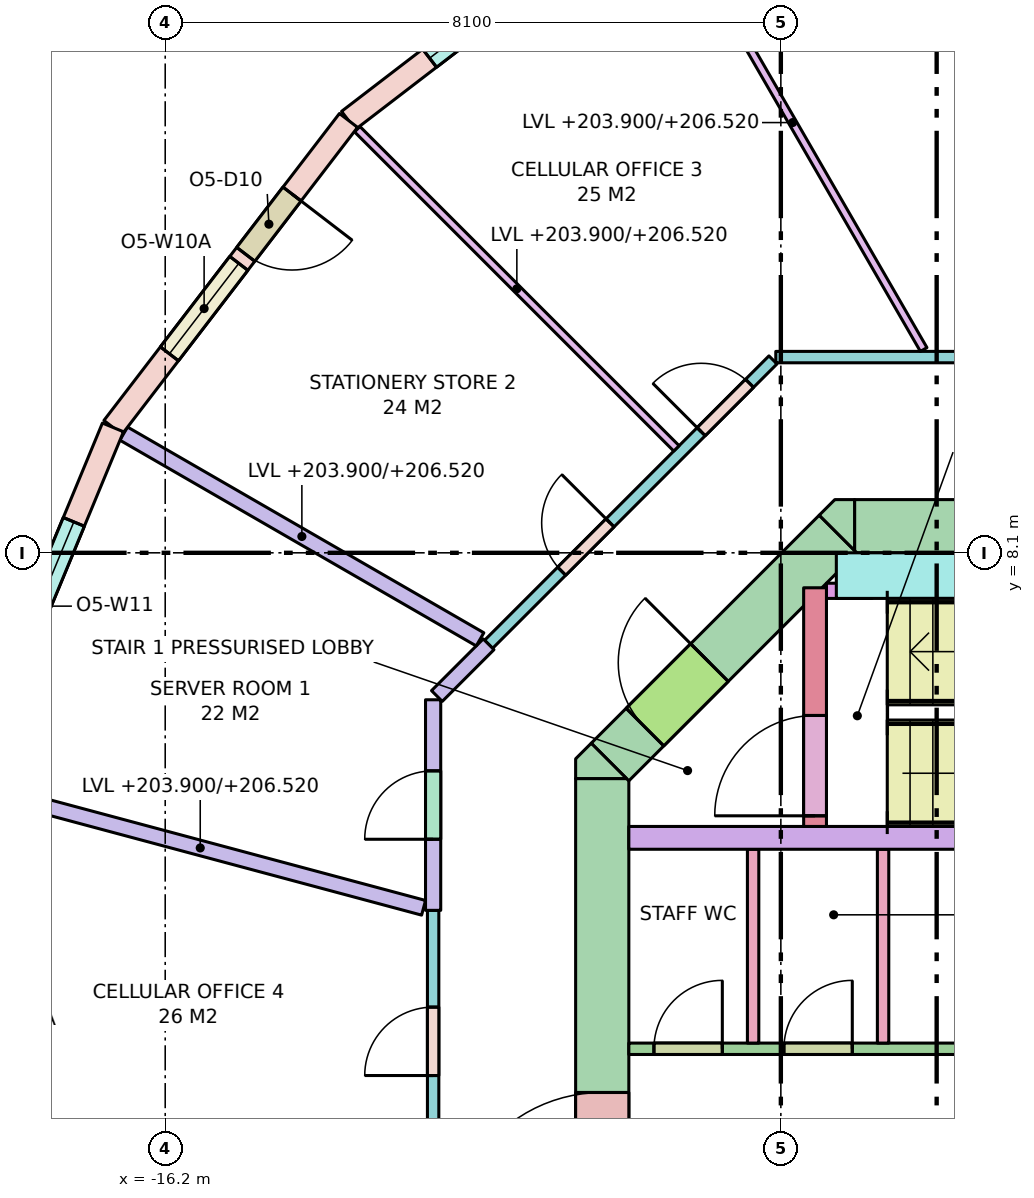
"""IFC4 building model, lengths in metres.
Left out: names, types, materials, properties, quantities, classifications, styles, units other than length and angle.
Written with IfcOpenShell. Run it as: python <this file> out.ifc"""

import sys

from ifc_helpers import new_model, si_unit, direction, frame, frame_2d, origin, place, context, subcontext, project, spatial, polyline, rectangle, outline, extrude, element, fill, save


model = new_model("IFC4")
c1 = context("Model", 3, precision=1e-05, world=origin(), true_north=direction((0.0, 1.0)))
c2 = subcontext(c1, "Body", "Model", "MODEL_VIEW")
j1 = project(units=[si_unit("LENGTHUNIT", "METRE"), si_unit("PLANEANGLEUNIT", "RADIAN")], contexts=[c1])
p1 = place(None, origin())
s1 = spatial("IfcSite", under=j1, at=p1, CompositionType="ELEMENT")
p2 = place(p1, origin())
s2 = spatial("IfcBuilding", under=s1, at=p2, CompositionType="ELEMENT")
p3 = place(p2, frame((0.0, 0.0, 203.9)))
s3 = spatial("IfcBuildingStorey", under=s2, at=p3, CompositionType="ELEMENT", Elevation=203.9)
p4 = place(p3, frame((-7.13, 8.45, -0.28), z_axis=(0.0, 0.0, 1.0), x_axis=(1.0, 0.0, 0.0)))
e1 = element("IfcWall", 1, at=p4, inside=s3, PredefinedType="SHEAR", context=c2, shape_type="SweptSolid", body=[
    extrude(rectangle(XDim=14.26, YDim=0.7, at=frame_2d((7.13, 0.0))), origin(), (0.0, 0.0, 1.0), 3.7),
])
p5 = place(p4, frame((5.48, 0.0, 0.28)))
e2 = element("IfcOpeningElement", 2, at=p5, cuts=e1, PredefinedType="OPENING", context=c2, shape_type="SweptSolid", body=[
    extrude(rectangle(XDim=0.7, YDim=2.1, at=frame_2d((0.35, 1.05))), frame((0.0, 0.36, 0.0), z_axis=(0.0, -1.0, 0.0), x_axis=(1.0, 0.0, 0.0)), (0.0, 0.0, 1.0), 0.72),
])
p6 = place(p4, frame((6.53, 0.0, 0.28)))
e3 = element("IfcOpeningElement", 3, at=p6, cuts=e1, PredefinedType="OPENING", context=c2, shape_type="SweptSolid", body=[
    extrude(rectangle(XDim=0.85, YDim=2.1, at=frame_2d((0.425, 1.05))), frame((0.0, 0.36, 0.0), z_axis=(0.0, -1.0, 0.0), x_axis=(1.0, 0.0, 0.0)), (0.0, 0.0, 1.0), 0.72),
])
p7 = place(p4, frame((7.83, 0.0, 0.28)))
e4 = element("IfcOpeningElement", 4, at=p7, cuts=e1, PredefinedType="OPENING", context=c2, shape_type="SweptSolid", body=[
    extrude(rectangle(XDim=0.85, YDim=2.1, at=frame_2d((0.425, 1.05))), frame((0.0, 0.36, 0.0), z_axis=(0.0, -1.0, 0.0), x_axis=(1.0, 0.0, 0.0)), (0.0, 0.0, 1.0), 0.72),
])
p8 = place(p3, frame((-10.45, -5.13, -0.28), z_axis=(0.0, 0.0, 1.0), x_axis=(0.0, 1.0, 0.0)))
e5 = element("IfcWall", 5, at=p8, inside=s3, PredefinedType="SHEAR", context=c2, shape_type="SweptSolid", body=[
    extrude(rectangle(XDim=10.26, YDim=0.7, at=frame_2d((5.13, 0.0))), origin(), (0.0, 0.0, 1.0), 3.7),
])
p9 = place(p8, frame((4.13, 0.0, 0.28)))
e6 = element("IfcOpeningElement", 6, at=p9, cuts=e5, PredefinedType="OPENING", context=c2, shape_type="SweptSolid", body=[
    extrude(rectangle(XDim=2.0, YDim=2.1, at=frame_2d((1.0, 1.05))), frame((0.0, 0.36, 0.0), z_axis=(0.0, -1.0, 0.0), x_axis=(1.0, 0.0, 0.0)), (0.0, 0.0, 1.0), 0.72),
])
p10 = place(p3, frame((-10.347, 5.347, -0.28), z_axis=(0.0, 0.0, 1.0), x_axis=(0.707106781187, 0.707106781187, 0.0)))
e7 = element("IfcWall", 7, at=p10, inside=s3, PredefinedType="SHEAR", context=c2, shape_type="SweptSolid", body=[
    extrude(rectangle(XDim=4.243, YDim=0.7, at=frame_2d((2.121, 0.0))), origin(), (0.0, 0.0, 1.0), 3.7),
])
p11 = place(p10, frame((0.65, 0.0, 0.28)))
e8 = element("IfcOpeningElement", 8, at=p11, cuts=e7, PredefinedType="OPENING", context=c2, shape_type="SweptSolid", body=[
    extrude(rectangle(XDim=1.2, YDim=2.1, at=frame_2d((0.6, 1.05))), frame((0.0, 0.36, 0.0), z_axis=(0.0, -1.0, 0.0), x_axis=(1.0, 0.0, 0.0)), (0.0, 0.0, 1.0), 0.72),
])
p12 = place(p3, frame((0.0, 0.0, -0.28)))
e9 = element("IfcWall", 9, at=p12, inside=s3, PredefinedType="SHEAR", context=c2, shape_type="SweptSolid", body=[
    extrude(outline(polyline([(-10.595, 5.595), (-10.595, 5.595), (-10.595, 5.595), (-10.13, 5.13), (-10.8, 5.13), (-10.8, 5.13), (-10.8, 5.39), (-10.595, 5.595)])), origin(), (0.0, 0.0, 1.0), 3.7),
])
p13 = place(p3, frame((0.0, 0.0, -0.28)))
e10 = element("IfcWall", 10, at=p13, inside=s3, PredefinedType="SHEAR", context=c2, shape_type="SweptSolid", body=[
    extrude(outline(polyline([(-7.39, 8.8), (-7.13, 8.8), (-7.13, 8.8), (-7.13, 8.13), (-7.595, 8.595), (-7.595, 8.595), (-7.595, 8.595), (-7.39, 8.8)])), origin(), (0.0, 0.0, 1.0), 3.7),
])
p14 = place(p3, frame((-10.1, 4.35, 0.0), z_axis=(0.0, 0.0, 1.0), x_axis=(1.0, 0.0, 0.0)))
e11 = element("IfcWall", 11, at=p14, inside=s3, PredefinedType="SOLIDWALL", context=c2, shape_type="SweptSolid", body=[
    extrude(rectangle(XDim=8.1, YDim=0.3, at=frame_2d((4.05, 0.0))), origin(), (0.0, 0.0, 1.0), 3.42),
])
p15 = place(p3, frame((-7.65, 4.5, 0.0), z_axis=(0.0, 0.0, 1.0), x_axis=(0.0, 1.0, 0.0)))
e12 = element("IfcWall", 12, at=p15, inside=s3, PredefinedType="SHEAR", context=c2, shape_type="SweptSolid", body=[
    extrude(rectangle(XDim=3.14, YDim=0.3, at=frame_2d((1.57, 0.0))), origin(), (0.0, 0.0, 1.0), 3.42),
])
p16 = place(p15, frame((0.14, 0.0, 0.0)))
e13 = element("IfcOpeningElement", 13, at=p16, cuts=e12, PredefinedType="OPENING", context=c2, shape_type="SweptSolid", body=[
    extrude(rectangle(XDim=1.32, YDim=2.1, at=frame_2d((0.66, 1.05))), frame((0.0, 0.16, 0.0), z_axis=(0.0, -1.0, 0.0), x_axis=(1.0, 0.0, 0.0)), (0.0, 0.0, 1.0), 0.32),
])
p17 = place(p3, frame((-7.37, 7.8, 0.0), z_axis=(0.0, 0.0, 1.0), x_axis=(1.0, 0.0, 0.0)))
e14 = element("IfcWall", 14, at=p17, inside=s3, PredefinedType="SHEAR", context=c2, shape_type="SweptSolid", body=[
    extrude(rectangle(XDim=5.37, YDim=0.6, at=frame_2d((2.685, 0.0))), origin(), (0.0, 0.0, 1.0), 3.42),
])
p18 = place(p3, frame((-7.5, 7.6, 0.0), z_axis=(0.0, 0.0, 1.0), x_axis=(1.0, 0.0, 0.0)))
e15 = element("IfcWall", 15, at=p18, inside=s3, PredefinedType="SHEAR", context=c2, shape_type="SweptSolid", body=[
    extrude(rectangle(XDim=0.6, YDim=0.2, at=frame_2d((0.3, 0.0))), origin(), (0.0, 0.0, 1.0), 3.42),
])
p19 = place(p3, frame((-9.75, 16.887, 0.0), z_axis=(0.0, 0.0, 1.0), x_axis=(-0.79335619014, -0.608757714995, 0.0)))
e16 = element("IfcWall", 16, at=p19, inside=s3, PredefinedType="STANDARD", context=c2, shape_type="SweptSolid", body=[
    extrude(rectangle(XDim=5.091, YDim=0.3, at=frame_2d((2.545, 0.0))), origin(), (0.0, 0.0, 1.0), 3.42),
])
p20 = place(p19, frame((1.345, 0.0, 0.8)))
e17 = element("IfcOpeningElement", 17, at=p20, cuts=e16, PredefinedType="OPENING", context=c2, shape_type="SweptSolid", body=[
    extrude(rectangle(XDim=2.4, YDim=2.4, at=frame_2d((1.2, 1.2))), frame((0.0, 0.16, 0.0), z_axis=(0.0, -1.0, 0.0), x_axis=(1.0, 0.0, 0.0)), (0.0, 0.0, 1.0), 0.32),
])
p21 = place(p3, frame((-13.789, 13.789, 0.0), z_axis=(0.0, 0.0, 1.0), x_axis=(-0.608757714995, -0.79335619014, 0.0)))
e18 = element("IfcWall", 18, at=p21, inside=s3, PredefinedType="STANDARD", context=c2, shape_type="SweptSolid", body=[
    extrude(rectangle(XDim=5.091, YDim=0.3, at=frame_2d((2.545, 0.0))), origin(), (0.0, 0.0, 1.0), 3.42),
])
p22 = place(p21, frame((1.22, 0.0, 0.0)))
e19 = element("IfcOpeningElement", 19, at=p22, cuts=e18, PredefinedType="OPENING", context=c2, shape_type="SweptSolid", body=[
    extrude(rectangle(XDim=1.0, YDim=2.4, at=frame_2d((0.5, 1.2))), frame((0.0, 0.16, 0.0), z_axis=(0.0, -1.0, 0.0), x_axis=(1.0, 0.0, 0.0)), (0.0, 0.0, 1.0), 0.32),
])
p23 = place(p21, frame((2.37, 0.0, 0.8)))
e20 = element("IfcOpeningElement", 20, at=p23, cuts=e18, PredefinedType="OPENING", context=c2, shape_type="SweptSolid", body=[
    extrude(rectangle(XDim=1.5, YDim=2.4, at=frame_2d((0.75, 1.2))), frame((0.0, 0.16, 0.0), z_axis=(0.0, -1.0, 0.0), x_axis=(1.0, 0.0, 0.0)), (0.0, 0.0, 1.0), 0.32),
])
p24 = place(p3, frame((-16.887, 9.75, 0.0), z_axis=(0.0, 0.0, 1.0), x_axis=(-0.382724538613, -0.923862504675, 0.0)))
e21 = element("IfcWall", 21, at=p24, inside=s3, PredefinedType="STANDARD", context=c2, shape_type="SweptSolid", body=[
    extrude(rectangle(XDim=5.091, YDim=0.3, at=frame_2d((2.545, 0.0))), origin(), (0.0, 0.0, 1.0), 3.42),
])
p25 = place(p24, frame((1.345, 0.0, 0.8)))
e22 = element("IfcOpeningElement", 22, at=p25, cuts=e21, PredefinedType="OPENING", context=c2, shape_type="SweptSolid", body=[
    extrude(rectangle(XDim=2.4, YDim=2.4, at=frame_2d((1.2, 1.2))), frame((0.0, 0.16, 0.0), z_axis=(0.0, -1.0, 0.0), x_axis=(1.0, 0.0, 0.0)), (0.0, 0.0, 1.0), 0.32),
])
for number, where, z_axis, x_axis in (
    (23, (-8.465, 1.65, 0.0), (0.0, 0.0, 1.0), (0.0, 1.0, 0.0)),
    (24, (-6.755, 1.65, 0.0), (0.0, 0.0, 1.0), (0.0, 1.0, 0.0)),
):
    element("IfcWall", number, at=place(p3, frame(where, z_axis=z_axis, x_axis=x_axis)), inside=s3, PredefinedType="PARTITIONING", context=c2, shape_type="SweptSolid", body=[
        extrude(rectangle(XDim=2.55, YDim=0.15, at=frame_2d((1.275, 0.0))), origin(), (0.0, 0.0, 1.0), 3.42),
    ])
p26 = place(p3, frame((-10.1, 1.575, 0.0), z_axis=(0.0, 0.0, 1.0), x_axis=(1.0, 0.0, 0.0)))
e25 = element("IfcWall", 25, at=p26, inside=s3, PredefinedType="PARTITIONING", context=c2, shape_type="SweptSolid", body=[
    extrude(rectangle(XDim=8.1, YDim=0.15, at=frame_2d((4.05, 0.0))), origin(), (0.0, 0.0, 1.0), 3.42),
])
p27 = place(p26, frame((0.33, 0.0, 0.0)))
e26 = element("IfcOpeningElement", 26, at=p27, cuts=e25, PredefinedType="OPENING", context=c2, shape_type="SweptSolid", body=[
    extrude(rectangle(XDim=0.9, YDim=2.1, at=frame_2d((0.45, 1.05))), frame((0.0, 0.085, 0.0), z_axis=(0.0, -1.0, 0.0), x_axis=(1.0, 0.0, 0.0)), (0.0, 0.0, 1.0), 0.17),
])
p28 = place(p26, frame((2.04, 0.0, 0.0)))
e27 = element("IfcOpeningElement", 27, at=p28, cuts=e25, PredefinedType="OPENING", context=c2, shape_type="SweptSolid", body=[
    extrude(rectangle(XDim=0.9, YDim=2.1, at=frame_2d((0.45, 1.05))), frame((0.0, 0.085, 0.0), z_axis=(0.0, -1.0, 0.0), x_axis=(1.0, 0.0, 0.0)), (0.0, 0.0, 1.0), 0.17),
])
p29 = place(p26, frame((5.31, 0.0, 0.0)))
e28 = element("IfcOpeningElement", 28, at=p29, cuts=e25, PredefinedType="OPENING", context=c2, shape_type="SweptSolid", body=[
    extrude(rectangle(XDim=0.9, YDim=2.1, at=frame_2d((0.45, 1.05))), frame((0.0, 0.085, 0.0), z_axis=(0.0, -1.0, 0.0), x_axis=(1.0, 0.0, 0.0)), (0.0, 0.0, 1.0), 0.17),
])
p30 = place(p3, frame((-12.675, -6.167, 0.0), z_axis=(0.0, 0.0, 1.0), x_axis=(0.0, 1.0, 0.0)))
e29 = element("IfcWall", 29, at=p30, inside=s3, PredefinedType="PARTITIONING", context=c2, shape_type="SweptSolid", body=[
    extrude(rectangle(XDim=9.563, YDim=0.15, at=frame_2d((4.781, 0.0))), origin(), (0.0, 0.0, 1.0), 2.62),
])
p31 = place(p30, frame((7.39, 0.0, 0.0)))
e30 = element("IfcOpeningElement", 30, at=p31, cuts=e29, PredefinedType="OPENING", context=c2, shape_type="SweptSolid", body=[
    extrude(rectangle(XDim=0.9, YDim=2.1, at=frame_2d((0.45, 1.05))), frame((0.0, 0.085, 0.0), z_axis=(0.0, -1.0, 0.0), x_axis=(1.0, 0.0, 0.0)), (0.0, 0.0, 1.0), 0.17),
])
p32 = place(p3, frame((-12.675, 3.396, 0.0), z_axis=(0.0, 0.0, 1.0), x_axis=(0.0, 1.0, 0.0)))
e31 = element("IfcWall", 31, at=p32, inside=s3, PredefinedType="PARTITIONING", context=c2, shape_type="SweptSolid", body=[
    extrude(rectangle(XDim=2.77, YDim=0.2, at=frame_2d((1.385, 0.0))), origin(), (0.0, 0.0, 1.0), 2.62),
])
p33 = place(p32, frame((0.935, 0.0, 0.0)))
e32 = element("IfcOpeningElement", 32, at=p33, cuts=e31, PredefinedType="OPENING", context=c2, shape_type="SweptSolid", body=[
    extrude(rectangle(XDim=0.9, YDim=2.1, at=frame_2d((0.45, 1.05))), frame((0.0, 0.11, 0.0), z_axis=(0.0, -1.0, 0.0), x_axis=(1.0, 0.0, 0.0)), (0.0, 0.0, 1.0), 0.22),
])
p34 = place(p3, frame((-12.625, 6.216, 0.0), z_axis=(0.0, 0.0, 1.0), x_axis=(0.707106781187, 0.707106781187, 0.0)))
e33 = element("IfcWall", 33, at=p34, inside=s3, PredefinedType="PARTITIONING", context=c2, shape_type="SweptSolid", body=[
    extrude(rectangle(XDim=0.962, YDim=0.2, at=frame_2d((0.481, 0.0))), origin(), (0.0, 0.0, 1.0), 2.62),
])
p35 = place(p3, frame((-11.945, 6.896, 0.0), z_axis=(0.0, 0.0, 1.0), x_axis=(0.707106781187, 0.707106781187, 0.0)))
e34 = element("IfcWall", 34, at=p35, inside=s3, PredefinedType="PARTITIONING", context=c2, shape_type="SweptSolid", body=[
    extrude(rectangle(XDim=5.291, YDim=0.15, at=frame_2d((2.646, 0.0))), origin(), (0.0, 0.0, 1.0), 2.62),
])
p36 = place(p35, frame((3.956, 0.0, 0.0)))
e35 = element("IfcOpeningElement", 35, at=p36, cuts=e34, PredefinedType="OPENING", context=c2, shape_type="SweptSolid", body=[
    extrude(rectangle(XDim=0.9, YDim=2.1, at=frame_2d((0.45, 1.05))), frame((0.0, 0.085, 0.0), z_axis=(0.0, -1.0, 0.0), x_axis=(1.0, 0.0, 0.0)), (0.0, 0.0, 1.0), 0.17),
])
p37 = place(p35, frame((1.36, 0.0, 0.0)))
e36 = element("IfcOpeningElement", 36, at=p37, cuts=e34, PredefinedType="OPENING", context=c2, shape_type="SweptSolid", body=[
    extrude(rectangle(XDim=0.9, YDim=2.1, at=frame_2d((0.45, 1.05))), frame((0.0, 0.085, 0.0), z_axis=(0.0, -1.0, 0.0), x_axis=(1.0, 0.0, 0.0)), (0.0, 0.0, 1.0), 0.17),
])
p38 = place(p3, frame((-8.167, 10.675, 0.0), z_axis=(0.0, 0.0, 1.0), x_axis=(1.0, 0.0, 0.0)))
e37 = element("IfcWall", 37, at=p38, inside=s3, PredefinedType="PARTITIONING", context=c2, shape_type="SweptSolid", body=[
    extrude(rectangle(XDim=16.333, YDim=0.15, at=frame_2d((8.167, 0.0))), origin(), (0.0, 0.0, 1.0), 2.62),
])
p39 = place(p38, frame((13.155, 0.0, 0.0)))
e38 = element("IfcOpeningElement", 38, at=p39, cuts=e37, PredefinedType="OPENING", context=c2, shape_type="SweptSolid", body=[
    extrude(rectangle(XDim=1.0, YDim=2.1, at=frame_2d((0.5, 1.05))), frame((0.0, 0.085, 0.0), z_axis=(0.0, -1.0, 0.0), x_axis=(1.0, 0.0, 0.0)), (0.0, 0.0, 1.0), 0.17),
])
p40 = place(p38, frame((9.148, 0.0, 0.0)))
e39 = element("IfcOpeningElement", 39, at=p40, cuts=e37, PredefinedType="OPENING", context=c2, shape_type="SweptSolid", body=[
    extrude(rectangle(XDim=0.9, YDim=2.1, at=frame_2d((0.45, 1.05))), frame((0.0, 0.085, 0.0), z_axis=(0.0, -1.0, 0.0), x_axis=(1.0, 0.0, 0.0)), (0.0, 0.0, 1.0), 0.17),
])
p41 = place(p38, frame((5.835, 0.0, 0.0)))
e40 = element("IfcOpeningElement", 40, at=p41, cuts=e37, PredefinedType="OPENING", context=c2, shape_type="SweptSolid", body=[
    extrude(rectangle(XDim=1.8, YDim=2.1, at=frame_2d((0.9, 1.05))), frame((0.0, 0.085, 0.0), z_axis=(0.0, -1.0, 0.0), x_axis=(1.0, 0.0, 0.0)), (0.0, 0.0, 1.0), 0.17),
])
p42 = place(p38, frame((2.751, 0.0, 0.0)))
e41 = element("IfcOpeningElement", 41, at=p42, cuts=e37, PredefinedType="OPENING", context=c2, shape_type="SweptSolid", body=[
    extrude(rectangle(XDim=1.8, YDim=2.1, at=frame_2d((0.9, 1.05))), frame((0.0, 0.085, 0.0), z_axis=(0.0, -1.0, 0.0), x_axis=(1.0, 0.0, 0.0)), (0.0, 0.0, 1.0), 0.17),
])
p43 = place(p3, frame((-6.221, 10.775, 0.0), z_axis=(0.0, 0.0, 1.0), x_axis=(-0.500015661236, 0.866016361577, 0.0)))
e42 = element("IfcWall", 42, at=p43, inside=s3, PredefinedType="PARTITIONING", context=c2, shape_type="SweptSolid", body=[
    extrude(rectangle(XDim=6.895, YDim=0.1, at=frame_2d((3.448, 0.0))), origin(), (0.0, 0.0, 1.0), 2.62),
])
p44 = place(p3, frame((-9.474, 9.474, 0.0), z_axis=(0.0, 0.0, 1.0), x_axis=(-0.707106781187, 0.707106781187, 0.0)))
e43 = element("IfcWall", 43, at=p44, inside=s3, PredefinedType="PARTITIONING", context=c2, shape_type="SweptSolid", body=[
    extrude(rectangle(XDim=5.938, YDim=0.1, at=frame_2d((2.969, 0.0))), origin(), (0.0, 0.0, 1.0), 2.62),
])
p45 = place(p3, frame((-12.058, 6.961, 0.0), z_axis=(0.0, 0.0, 1.0), x_axis=(-0.86601436245, 0.500019123664, 0.0)))
e44 = element("IfcWall", 44, at=p45, inside=s3, PredefinedType="PARTITIONING", context=c2, shape_type="SweptSolid", body=[
    extrude(rectangle(XDim=5.414, YDim=0.2, at=frame_2d((2.707, 0.0))), origin(), (0.0, 0.0, 1.0), 2.62),
])
p46 = place(p3, frame((-12.801, 3.43, 0.0), z_axis=(0.0, 0.0, 1.0), x_axis=(-0.965929245953, 0.258806282407, 0.0)))
e45 = element("IfcWall", 45, at=p46, inside=s3, PredefinedType="PARTITIONING", context=c2, shape_type="SweptSolid", body=[
    extrude(rectangle(XDim=6.084, YDim=0.2, at=frame_2d((3.042, 0.0))), origin(), (0.0, 0.0, 1.0), 2.62),
])
p47 = place(p20, origin())
e46 = element("IfcWindow", 46, at=p47, inside=s3, PartitioningType="SINGLE_PANEL", PredefinedType="WINDOW", context=c2, shape_type="SweptSolid", body=[
    extrude(rectangle(XDim=2.4, YDim=2.4, at=frame_2d((1.2, 1.2))), frame((0.0, 0.03, 0.0), z_axis=(0.0, -1.0, 0.0), x_axis=(1.0, 0.0, 0.0)), (0.0, 0.0, 1.0), 0.06),
])
fill(e17, e46)
p48 = place(p22, origin())
e47 = element("IfcDoor", 47, at=p48, inside=s3, OperationType="SINGLE_SWING_LEFT", PredefinedType="DOOR", context=c2, shape_type="SweptSolid", body=[
    extrude(rectangle(XDim=1.0, YDim=2.4, at=frame_2d((0.5, 1.2))), frame((0.0, 0.025, 0.0), z_axis=(0.0, -1.0, 0.0), x_axis=(1.0, 0.0, 0.0)), (0.0, 0.0, 1.0), 0.05),
])
fill(e19, e47)
p49 = place(p23, origin())
e48 = element("IfcWindow", 48, at=p49, inside=s3, PartitioningType="SINGLE_PANEL", PredefinedType="WINDOW", context=c2, shape_type="SweptSolid", body=[
    extrude(rectangle(XDim=1.5, YDim=2.4, at=frame_2d((0.75, 1.2))), frame((0.0, 0.03, 0.0), z_axis=(0.0, -1.0, 0.0), x_axis=(1.0, 0.0, 0.0)), (0.0, 0.0, 1.0), 0.06),
])
fill(e20, e48)
p50 = place(p25, origin())
e49 = element("IfcWindow", 49, at=p50, inside=s3, PartitioningType="SINGLE_PANEL", PredefinedType="WINDOW", context=c2, shape_type="SweptSolid", body=[
    extrude(rectangle(XDim=2.4, YDim=2.4, at=frame_2d((1.2, 1.2))), frame((0.0, 0.03, 0.0), z_axis=(0.0, -1.0, 0.0), x_axis=(1.0, 0.0, 0.0)), (0.0, 0.0, 1.0), 0.06),
])
fill(e22, e49)
p51 = place(p16, origin())
e50 = element("IfcDoor", 50, at=p51, inside=s3, OperationType="DOUBLE_DOOR_SINGLE_SWING", PredefinedType="DOOR", context=c2, shape_type="SweptSolid", body=[
    extrude(rectangle(XDim=1.32, YDim=2.1, at=frame_2d((0.66, 1.05))), frame((0.0, 0.025, 0.0), z_axis=(0.0, -1.0, 0.0), x_axis=(1.0, 0.0, 0.0)), (0.0, 0.0, 1.0), 0.05),
])
fill(e13, e50)
p52 = place(p11, origin())
e51 = element("IfcDoor", 51, at=p52, inside=s3, OperationType="SINGLE_SWING_RIGHT", PredefinedType="DOOR", context=c2, shape_type="SweptSolid", body=[
    extrude(rectangle(XDim=1.2, YDim=2.1, at=frame_2d((0.6, 1.05))), frame((0.0, 0.025, 0.0), z_axis=(0.0, -1.0, 0.0), x_axis=(1.0, 0.0, 0.0)), (0.0, 0.0, 1.0), 0.05),
])
fill(e8, e51)
p53 = place(p9, origin())
e52 = element("IfcDoor", 52, at=p53, inside=s3, OperationType="DOUBLE_DOOR_SINGLE_SWING", PredefinedType="DOOR", context=c2, shape_type="SweptSolid", body=[
    extrude(rectangle(XDim=2.0, YDim=2.1, at=frame_2d((1.0, 1.05))), frame((0.0, 0.025, 0.0), z_axis=(0.0, -1.0, 0.0), x_axis=(1.0, 0.0, 0.0)), (0.0, 0.0, 1.0), 0.05),
])
fill(e6, e52)
p54 = place(p27, origin())
e53 = element("IfcDoor", 53, at=p54, inside=s3, OperationType="SINGLE_SWING_RIGHT", PredefinedType="DOOR", context=c2, shape_type="SweptSolid", body=[
    extrude(rectangle(XDim=0.9, YDim=2.1, at=frame_2d((0.45, 1.05))), frame((0.0, 0.025, 0.0), z_axis=(0.0, -1.0, 0.0), x_axis=(1.0, 0.0, 0.0)), (0.0, 0.0, 1.0), 0.05),
])
fill(e26, e53)
p55 = place(p28, origin())
e54 = element("IfcDoor", 54, at=p55, inside=s3, OperationType="SINGLE_SWING_RIGHT", PredefinedType="DOOR", context=c2, shape_type="SweptSolid", body=[
    extrude(rectangle(XDim=0.9, YDim=2.1, at=frame_2d((0.45, 1.05))), frame((0.0, 0.025, 0.0), z_axis=(0.0, -1.0, 0.0), x_axis=(1.0, 0.0, 0.0)), (0.0, 0.0, 1.0), 0.05),
])
fill(e27, e54)
p56 = place(p36, origin())
e55 = element("IfcDoor", 55, at=p56, inside=s3, OperationType="SINGLE_SWING_LEFT", PredefinedType="DOOR", context=c2, shape_type="SweptSolid", body=[
    extrude(rectangle(XDim=0.9, YDim=2.1, at=frame_2d((0.45, 1.05))), frame((0.0, 0.025, 0.0), z_axis=(0.0, -1.0, 0.0), x_axis=(1.0, 0.0, 0.0)), (0.0, 0.0, 1.0), 0.05),
])
fill(e35, e55)
p57 = place(p37, origin())
e56 = element("IfcDoor", 56, at=p57, inside=s3, OperationType="SINGLE_SWING_RIGHT", PredefinedType="DOOR", context=c2, shape_type="SweptSolid", body=[
    extrude(rectangle(XDim=0.9, YDim=2.1, at=frame_2d((0.45, 1.05))), frame((0.0, 0.025, 0.0), z_axis=(0.0, -1.0, 0.0), x_axis=(1.0, 0.0, 0.0)), (0.0, 0.0, 1.0), 0.05),
])
fill(e36, e56)
p58 = place(p33, origin())
e57 = element("IfcDoor", 57, at=p58, inside=s3, OperationType="SINGLE_SWING_LEFT", PredefinedType="DOOR", context=c2, shape_type="SweptSolid", body=[
    extrude(rectangle(XDim=0.9, YDim=2.1, at=frame_2d((0.45, 1.05))), frame((0.0, 0.025, 0.0), z_axis=(0.0, -1.0, 0.0), x_axis=(1.0, 0.0, 0.0)), (0.0, 0.0, 1.0), 0.05),
])
fill(e32, e57)
p59 = place(p31, origin())
e58 = element("IfcDoor", 58, at=p59, inside=s3, OperationType="SINGLE_SWING_LEFT", PredefinedType="DOOR", context=c2, shape_type="SweptSolid", body=[
    extrude(rectangle(XDim=0.9, YDim=2.1, at=frame_2d((0.45, 1.05))), frame((0.0, 0.025, 0.0), z_axis=(0.0, -1.0, 0.0), x_axis=(1.0, 0.0, 0.0)), (0.0, 0.0, 1.0), 0.05),
])
fill(e30, e58)
save(model, sys.argv[1])
